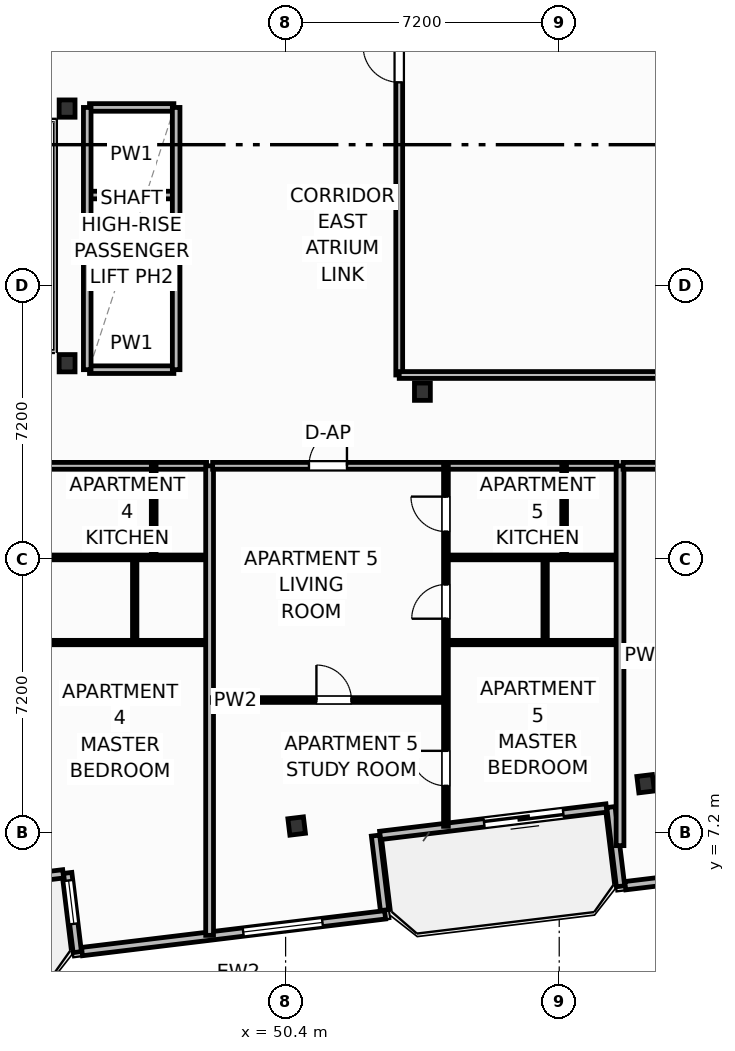
"""IFC4 building model, lengths in metres.
Left out: names, types, materials, properties, quantities, classifications, styles, units other than length and angle.
Written with IfcOpenShell. Run it as: python <this file> out.ifc"""

import sys

from ifc_helpers import new_model, si_unit, direction, frame, frame_2d, origin, origin_2d, place, context, subcontext, project, spatial, rectangle, i_section, extrude, element, fill, save


model = new_model("IFC4")
c1 = context("Model", 3, precision=1e-05, world=origin(), true_north=direction((0.0, 1.0)))
c2 = subcontext(c1, "Body", "Model", "MODEL_VIEW")
j1 = project(units=[si_unit("LENGTHUNIT", "METRE"), si_unit("PLANEANGLEUNIT", "RADIAN")], contexts=[c1])
p1 = place(None, origin())
s1 = spatial("IfcSite", under=j1, at=p1, CompositionType="ELEMENT")
p2 = place(p1, origin())
s2 = spatial("IfcBuilding", under=s1, at=p2, CompositionType="ELEMENT")
p3 = place(p2, frame((0.0, 0.0, 167.2)))
s3 = spatial("IfcBuildingStorey", under=s2, at=p3, CompositionType="ELEMENT", Elevation=167.2)
for number, where, z_axis, x_axis in (
    (1, (44.65, 19.55, 0.0), (0.0, 0.0, 1.0), (1.0, 0.0, 0.0)),
    (2, (44.65, 26.25, 0.0), (0.0, 0.0, 1.0), (1.0, 0.0, 0.0)),
    (3, (54.0, 18.8, 0.0), (0.0, 0.0, 1.0), (1.0, 0.0, 0.0)),
):
    element("IfcColumn", number, at=place(p3, frame(where, z_axis=z_axis, x_axis=x_axis)), inside=s3, PredefinedType="COLUMN", context=c2, shape_type="SweptSolid", body=[
        extrude(i_section(OverallWidth=0.418, OverallDepth=0.455, WebThickness=0.042, FlangeThickness=0.068, FilletRadius=0.025, at=origin_2d()), origin(), (0.0, 0.0, 1.0), 3.7),
    ])
for number, where, z_axis, x_axis in (
    (4, (50.691, 7.373, 0.0), (0.0, 0.0, 1.0), (0.993, 0.12, 0.0)),
    (5, (59.874, 8.486, 0.0), (0.0, 0.0, 1.0), (0.993, 0.12, 0.0)),
):
    element("IfcColumn", number, at=place(p3, frame(where, z_axis=z_axis, x_axis=x_axis)), inside=s3, PredefinedType="COLUMN", context=c2, shape_type="SweptSolid", body=[
        extrude(i_section(OverallWidth=0.412, OverallDepth=0.435, WebThickness=0.036, FlangeThickness=0.057, FilletRadius=0.025, at=origin_2d()), origin(), (0.0, 0.0, 1.0), 3.7),
    ])
p4 = place(p3, frame((44.548, 6.114, 0.0), z_axis=(0.0, 0.0, 1.0), x_axis=(-0.992735402148, -0.120318000826, 0.0)))
e6 = element("IfcWall", 6, at=p4, inside=s3, PredefinedType="SOLIDWALL", context=c2, shape_type="SweptSolid", body=[
    extrude(rectangle(XDim=6.0, YDim=0.22, at=frame_2d((3.0, 0.0))), origin(), (0.0, 0.0, 1.0), 2.73),
])
p5 = place(p4, frame((3.5, 0.0, 0.0)))
e7 = element("IfcOpeningElement", 7, at=p5, cuts=e6, PredefinedType="OPENING", context=c2, shape_type="SweptSolid", body=[
    extrude(rectangle(XDim=2.1, YDim=2.3, at=frame_2d((1.05, 1.15))), frame((0.0, 0.12, 0.0), z_axis=(0.0, -1.0, 0.0), x_axis=(1.0, 0.0, 0.0)), (0.0, 0.0, 1.0), 0.24),
])
p6 = place(p3, frame((58.843, 7.847, 0.0), z_axis=(0.0, 0.0, 1.0), x_axis=(-0.992729951822, -0.120362962556, 0.0)))
e8 = element("IfcWall", 8, at=p6, inside=s3, PredefinedType="SOLIDWALL", context=c2, shape_type="SweptSolid", body=[
    extrude(rectangle(XDim=6.0, YDim=0.22, at=frame_2d((3.0, 0.0))), origin(), (0.0, 0.0, 1.0), 2.73),
])
p7 = place(p6, frame((1.144, 0.0, 0.0)))
e9 = element("IfcOpeningElement", 9, at=p7, cuts=e8, PredefinedType="OPENING", context=c2, shape_type="SweptSolid", body=[
    extrude(rectangle(XDim=2.1, YDim=2.3, at=frame_2d((1.05, 1.15))), frame((0.0, 0.12, 0.0), z_axis=(0.0, -1.0, 0.0), x_axis=(1.0, 0.0, 0.0)), (0.0, 0.0, 1.0), 0.24),
])
p8 = place(p3, frame((44.666, 6.138, 0.0), z_axis=(0.0, 0.0, 1.0), x_axis=(0.120327895535, -0.992734202874, 0.0)))
e10 = element("IfcWall", 10, at=p8, inside=s3, PredefinedType="SOLIDWALL", context=c2, shape_type="SweptSolid", body=[
    extrude(rectangle(XDim=2.1, YDim=0.22, at=frame_2d((1.05, 0.0))), origin(), (0.0, 0.0, 1.0), 2.73),
])
p9 = place(p8, frame((0.2, 0.0, 0.8)))
e11 = element("IfcOpeningElement", 11, at=p9, cuts=e10, PredefinedType="OPENING", context=c2, shape_type="SweptSolid", body=[
    extrude(rectangle(XDim=1.15, YDim=1.4, at=frame_2d((0.575, 0.7))), frame((0.0, 0.12, 0.0), z_axis=(0.0, -1.0, 0.0), x_axis=(1.0, 0.0, 0.0)), (0.0, 0.0, 1.0), 0.24),
])
p10 = place(p3, frame((45.042, 4.069, 0.0), z_axis=(0.0, 0.0, 1.0), x_axis=(0.992731032022, 0.120354052946, 0.0)))
e12 = element("IfcWall", 12, at=p10, inside=s3, PredefinedType="SOLIDWALL", context=c2, shape_type="SweptSolid", body=[
    extrude(rectangle(XDim=8.035, YDim=0.22, at=frame_2d((4.018, 0.0))), origin(), (0.0, 0.0, 1.0), 2.73),
])
p11 = place(p10, frame((4.273, 0.0, 0.8)))
e13 = element("IfcOpeningElement", 13, at=p11, cuts=e12, PredefinedType="OPENING", context=c2, shape_type="SweptSolid", body=[
    extrude(rectangle(XDim=2.1, YDim=1.75, at=frame_2d((1.05, 0.875))), frame((0.0, 0.12, 0.0), z_axis=(0.0, -1.0, 0.0), x_axis=(1.0, 0.0, 0.0)), (0.0, 0.0, 1.0), 0.24),
])
p12 = place(p3, frame((53.004, 5.16, 0.0), z_axis=(0.0, 0.0, 1.0), x_axis=(-0.120397815541, 0.992725725472, 0.0)))
e14 = element("IfcWall", 14, at=p12, inside=s3, PredefinedType="SOLIDWALL", context=c2, shape_type="SweptSolid", body=[
    extrude(rectangle(XDim=1.975, YDim=0.22, at=frame_2d((0.988, 0.0))), origin(), (0.0, 0.0, 1.0), 2.73),
])
p13 = place(p3, frame((58.961, 7.872, 0.0), z_axis=(0.0, 0.0, 1.0), x_axis=(0.120327895535, -0.992734202874, 0.0)))
e15 = element("IfcWall", 15, at=p13, inside=s3, PredefinedType="SOLIDWALL", context=c2, shape_type="SweptSolid", body=[
    extrude(rectangle(XDim=2.1, YDim=0.22, at=frame_2d((1.05, 0.0))), origin(), (0.0, 0.0, 1.0), 2.73),
])
p14 = place(p3, frame((59.338, 5.802, 0.0), z_axis=(0.0, 0.0, 1.0), x_axis=(0.992731225757, 0.120352454927, 0.0)))
e16 = element("IfcWall", 16, at=p14, inside=s3, PredefinedType="SOLIDWALL", context=c2, shape_type="SweptSolid", body=[
    extrude(rectangle(XDim=12.447, YDim=0.22, at=frame_2d((6.224, 0.0))), origin(), (0.0, 0.0, 1.0), 2.73),
])
p15 = place(p14, frame((5.174, 0.0, 0.8)))
e17 = element("IfcOpeningElement", 17, at=p15, cuts=e16, PredefinedType="OPENING", context=c2, shape_type="SweptSolid", body=[
    extrude(rectangle(XDim=2.1, YDim=1.75, at=frame_2d((1.05, 0.875))), frame((0.0, 0.12, 0.0), z_axis=(0.0, -1.0, 0.0), x_axis=(1.0, 0.0, 0.0)), (0.0, 0.0, 1.0), 0.24),
])
p16 = place(p3, frame((37.68, 16.85, 0.0), z_axis=(0.0, 0.0, 1.0), x_axis=(1.0, 0.0, 0.0)))
e18 = element("IfcWall", 18, at=p16, inside=s3, PredefinedType="PARTITIONING", context=c2, shape_type="SweptSolid", body=[
    extrude(rectangle(XDim=10.64, YDim=0.18, at=frame_2d((5.32, 0.0))), origin(), (0.0, 0.0, 1.0), 3.45),
])
p17 = place(p16, frame((2.535, 0.0, 0.0)))
e19 = element("IfcOpeningElement", 19, at=p17, cuts=e18, PredefinedType="OPENING", context=c2, shape_type="SweptSolid", body=[
    extrude(rectangle(XDim=1.0, YDim=2.2, at=frame_2d((0.5, 1.1))), frame((0.0, 0.1, 0.0), z_axis=(0.0, -1.0, 0.0), x_axis=(1.0, 0.0, 0.0)), (0.0, 0.0, 1.0), 0.2),
])
p18 = place(p3, frame((43.889, 14.44, 0.0), z_axis=(0.0, 0.0, 1.0), x_axis=(1.0, 0.0, 0.0)))
e20 = element("IfcWall", 20, at=p18, inside=s3, PredefinedType="PARTITIONING", context=c2, shape_type="SweptSolid", body=[
    extrude(rectangle(XDim=4.431, YDim=0.125, at=frame_2d((2.215, 0.0))), origin(), (0.0, 0.0, 1.0), 3.45),
])
p19 = place(p3, frame((43.889, 12.2, 0.0), z_axis=(0.0, 0.0, 1.0), x_axis=(1.0, 0.0, 0.0)))
e21 = element("IfcWall", 21, at=p19, inside=s3, PredefinedType="PARTITIONING", context=c2, shape_type="SweptSolid", body=[
    extrude(rectangle(XDim=4.431, YDim=0.115, at=frame_2d((2.215, 0.0))), origin(), (0.0, 0.0, 1.0), 3.45),
])
p20 = place(p3, frame((46.929, 14.44, 0.0), z_axis=(0.0, 0.0, 1.0), x_axis=(0.0, 1.0, 0.0)))
e22 = element("IfcWall", 22, at=p20, inside=s3, PredefinedType="PARTITIONING", context=c2, shape_type="SweptSolid", body=[
    extrude(rectangle(XDim=2.41, YDim=0.125, at=frame_2d((1.205, 0.0))), origin(), (0.0, 0.0, 1.0), 3.45),
])
p21 = place(p3, frame((46.429, 12.2, 0.0), z_axis=(0.0, 0.0, 1.0), x_axis=(0.0, 1.0, 0.0)))
e23 = element("IfcWall", 23, at=p21, inside=s3, PredefinedType="PARTITIONING", context=c2, shape_type="SweptSolid", body=[
    extrude(rectangle(XDim=2.24, YDim=0.115, at=frame_2d((1.12, 0.0))), origin(), (0.0, 0.0, 1.0), 3.45),
])
p22 = place(p3, frame((48.4, 4.496, 0.0), z_axis=(0.0, 0.0, 1.0), x_axis=(0.0, 1.0, 0.0)))
e24 = element("IfcWall", 24, at=p22, inside=s3, PredefinedType="PARTITIONING", context=c2, shape_type="SweptSolid", body=[
    extrude(rectangle(XDim=12.354, YDim=0.205, at=frame_2d((6.177, 0.0))), origin(), (0.0, 0.0, 1.0), 3.45),
])
p23 = place(p3, frame((48.48, 10.688, 0.0), z_axis=(0.0, 0.0, 1.0), x_axis=(1.0, 0.0, 0.0)))
e25 = element("IfcWall", 25, at=p23, inside=s3, PredefinedType="PARTITIONING", context=c2, shape_type="SweptSolid", body=[
    extrude(rectangle(XDim=6.069, YDim=0.125, at=frame_2d((3.035, 0.0))), origin(), (0.0, 0.0, 1.0), 3.45),
])
p24 = place(p23, frame((2.731, 0.0, 0.0)))
e26 = element("IfcOpeningElement", 26, at=p24, cuts=e25, PredefinedType="OPENING", context=c2, shape_type="SweptSolid", body=[
    extrude(rectangle(XDim=0.92, YDim=2.05, at=frame_2d((0.46, 1.025))), frame((0.0, 0.073, 0.0), z_axis=(0.0, -1.0, 0.0), x_axis=(1.0, 0.0, 0.0)), (0.0, 0.0, 1.0), 0.145),
])
p25 = place(p3, frame((48.48, 16.85, 0.0), z_axis=(0.0, 0.0, 1.0), x_axis=(1.0, 0.0, 0.0)))
e27 = element("IfcWall", 27, at=p25, inside=s3, PredefinedType="PARTITIONING", context=c2, shape_type="SweptSolid", body=[
    extrude(rectangle(XDim=10.64, YDim=0.18, at=frame_2d((5.32, 0.0))), origin(), (0.0, 0.0, 1.0), 3.45),
])
p26 = place(p25, frame((2.535, 0.0, 0.0)))
e28 = element("IfcOpeningElement", 28, at=p26, cuts=e27, PredefinedType="OPENING", context=c2, shape_type="SweptSolid", body=[
    extrude(rectangle(XDim=1.0, YDim=2.2, at=frame_2d((0.5, 1.1))), frame((0.0, 0.1, 0.0), z_axis=(0.0, -1.0, 0.0), x_axis=(1.0, 0.0, 0.0)), (0.0, 0.0, 1.0), 0.2),
])
p27 = place(p3, frame((54.619, 7.365, 0.0), z_axis=(0.0, 0.0, 1.0), x_axis=(0.0, 1.0, 0.0)))
e29 = element("IfcWall", 29, at=p27, inside=s3, PredefinedType="PARTITIONING", context=c2, shape_type="SweptSolid", body=[
    extrude(rectangle(XDim=9.485, YDim=0.125, at=frame_2d((4.742, 0.0))), origin(), (0.0, 0.0, 1.0), 3.45),
])
p28 = place(p27, frame((1.065, 0.0, 0.0)))
e30 = element("IfcOpeningElement", 30, at=p28, cuts=e29, PredefinedType="OPENING", context=c2, shape_type="SweptSolid", body=[
    extrude(rectangle(XDim=0.92, YDim=2.05, at=frame_2d((0.46, 1.025))), frame((0.0, 0.073, 0.0), z_axis=(0.0, -1.0, 0.0), x_axis=(1.0, 0.0, 0.0)), (0.0, 0.0, 1.0), 0.145),
])
p29 = place(p27, frame((5.462, 0.0, 0.0)))
e31 = element("IfcOpeningElement", 31, at=p29, cuts=e29, PredefinedType="OPENING", context=c2, shape_type="SweptSolid", body=[
    extrude(rectangle(XDim=0.9, YDim=2.05, at=frame_2d((0.45, 1.025))), frame((0.0, 0.073, 0.0), z_axis=(0.0, -1.0, 0.0), x_axis=(1.0, 0.0, 0.0)), (0.0, 0.0, 1.0), 0.145),
])
p30 = place(p27, frame((7.755, 0.0, 0.0)))
e32 = element("IfcOpeningElement", 32, at=p30, cuts=e29, PredefinedType="OPENING", context=c2, shape_type="SweptSolid", body=[
    extrude(rectangle(XDim=0.92, YDim=2.05, at=frame_2d((0.46, 1.025))), frame((0.0, 0.073, 0.0), z_axis=(0.0, -1.0, 0.0), x_axis=(1.0, 0.0, 0.0)), (0.0, 0.0, 1.0), 0.145),
])
p31 = place(p3, frame((54.689, 14.44, 0.0), z_axis=(0.0, 0.0, 1.0), x_axis=(1.0, 0.0, 0.0)))
e33 = element("IfcWall", 33, at=p31, inside=s3, PredefinedType="PARTITIONING", context=c2, shape_type="SweptSolid", body=[
    extrude(rectangle(XDim=4.431, YDim=0.125, at=frame_2d((2.215, 0.0))), origin(), (0.0, 0.0, 1.0), 3.45),
])
p32 = place(p3, frame((54.689, 12.2, 0.0), z_axis=(0.0, 0.0, 1.0), x_axis=(1.0, 0.0, 0.0)))
e34 = element("IfcWall", 34, at=p32, inside=s3, PredefinedType="PARTITIONING", context=c2, shape_type="SweptSolid", body=[
    extrude(rectangle(XDim=4.431, YDim=0.115, at=frame_2d((2.215, 0.0))), origin(), (0.0, 0.0, 1.0), 3.45),
])
p33 = place(p3, frame((57.729, 14.44, 0.0), z_axis=(0.0, 0.0, 1.0), x_axis=(0.0, 1.0, 0.0)))
e35 = element("IfcWall", 35, at=p33, inside=s3, PredefinedType="PARTITIONING", context=c2, shape_type="SweptSolid", body=[
    extrude(rectangle(XDim=2.41, YDim=0.125, at=frame_2d((1.205, 0.0))), origin(), (0.0, 0.0, 1.0), 3.45),
])
p34 = place(p3, frame((57.229, 12.2, 0.0), z_axis=(0.0, 0.0, 1.0), x_axis=(0.0, 1.0, 0.0)))
e36 = element("IfcWall", 36, at=p34, inside=s3, PredefinedType="PARTITIONING", context=c2, shape_type="SweptSolid", body=[
    extrude(rectangle(XDim=2.24, YDim=0.115, at=frame_2d((1.12, 0.0))), origin(), (0.0, 0.0, 1.0), 3.45),
])
p35 = place(p3, frame((59.2, 6.856, 0.0), z_axis=(0.0, 0.0, 1.0), x_axis=(0.0, 1.0, 0.0)))
e37 = element("IfcWall", 37, at=p35, inside=s3, PredefinedType="PARTITIONING", context=c2, shape_type="SweptSolid", body=[
    extrude(rectangle(XDim=9.994, YDim=0.205, at=frame_2d((4.997, 0.0))), origin(), (0.0, 0.0, 1.0), 3.45),
])
p36 = place(p3, frame((59.28, 16.85, 0.0), z_axis=(0.0, 0.0, 1.0), x_axis=(1.0, 0.0, 0.0)))
e38 = element("IfcWall", 38, at=p36, inside=s3, PredefinedType="PARTITIONING", context=c2, shape_type="SweptSolid", body=[
    extrude(rectangle(XDim=16.322, YDim=0.18, at=frame_2d((8.161, 0.0))), origin(), (0.0, 0.0, 1.0), 3.45),
])
p37 = place(p36, frame((0.916, 0.0, 0.0)))
e39 = element("IfcOpeningElement", 39, at=p37, cuts=e38, PredefinedType="OPENING", context=c2, shape_type="SweptSolid", body=[
    extrude(rectangle(XDim=0.95, YDim=2.15, at=frame_2d((0.475, 1.075))), frame((0.0, 0.1, 0.0), z_axis=(0.0, -1.0, 0.0), x_axis=(1.0, 0.0, 0.0)), (0.0, 0.0, 1.0), 0.2),
])
p38 = place(p3, frame((53.39, 19.24, 0.0), z_axis=(0.0, 0.0, 1.0), x_axis=(0.0, 1.0, 0.0)))
e40 = element("IfcWall", 40, at=p38, inside=s3, PredefinedType="PARTITIONING", context=c2, shape_type="SweptSolid", body=[
    extrude(rectangle(XDim=20.06, YDim=0.18, at=frame_2d((10.03, 0.0))), origin(), (0.0, 0.0, 1.0), 3.45),
])
p39 = place(p38, frame((7.7, 0.0, 0.0)))
e41 = element("IfcOpeningElement", 41, at=p39, cuts=e40, PredefinedType="OPENING", context=c2, shape_type="SweptSolid", body=[
    extrude(rectangle(XDim=0.95, YDim=2.05, at=frame_2d((0.475, 1.025))), frame((0.0, 0.1, 0.0), z_axis=(0.0, -1.0, 0.0), x_axis=(1.0, 0.0, 0.0)), (0.0, 0.0, 1.0), 0.2),
])
p40 = place(p3, frame((53.39, 19.24, 0.0), z_axis=(0.0, 0.0, 1.0), x_axis=(1.0, 0.0, 0.0)))
e42 = element("IfcWall", 42, at=p40, inside=s3, PredefinedType="PARTITIONING", context=c2, shape_type="SweptSolid", body=[
    extrude(rectangle(XDim=21.922, YDim=0.18, at=frame_2d((10.961, 0.0))), origin(), (0.0, 0.0, 1.0), 2.662),
])
for number, where, z_axis, x_axis in (
    (43, (45.24, 21.675, 0.0), (0.0, 0.0, 1.0), (1.0, 0.0, 0.0)),
    (44, (45.24, 23.975, 0.0), (0.0, 0.0, 1.0), (1.0, 0.0, 0.0)),
):
    element("IfcWall", number, at=place(p3, frame(where, z_axis=z_axis, x_axis=x_axis)), inside=s3, PredefinedType="PARTITIONING", context=c2, shape_type="SweptSolid", body=[
        extrude(rectangle(XDim=2.22, YDim=0.2, at=frame_2d((1.11, 0.0))), origin(), (0.0, 0.0, 1.0), 3.45),
    ])
p41 = place(p3, frame((45.24, 19.38, 0.0), z_axis=(0.0, 0.0, 1.0), x_axis=(1.0, 0.0, 0.0)))
e45 = element("IfcWall", 45, at=p41, inside=s3, PredefinedType="PARTITIONING", context=c2, shape_type="SweptSolid", body=[
    extrude(rectangle(XDim=2.22, YDim=0.2, at=frame_2d((1.11, 0.0))), origin(), (0.0, 0.0, 1.0), 2.662),
])
p42 = place(p3, frame((45.24, 26.28, 0.0), z_axis=(0.0, 0.0, 1.0), x_axis=(1.0, 0.0, 0.0)))
e46 = element("IfcWall", 46, at=p42, inside=s3, PredefinedType="PARTITIONING", context=c2, shape_type="SweptSolid", body=[
    extrude(rectangle(XDim=2.22, YDim=0.2, at=frame_2d((1.11, 0.0))), origin(), (0.0, 0.0, 1.0), 3.45),
])
for number, where, z_axis, x_axis in (
    (47, (45.18, 19.38, 0.0), (0.0, 0.0, 1.0), (0.0, 1.0, 0.0)),
    (48, (47.52, 19.38, 0.0), (0.0, 0.0, 1.0), (0.0, 1.0, 0.0)),
):
    element("IfcWall", number, at=place(p3, frame(where, z_axis=z_axis, x_axis=x_axis)), inside=s3, PredefinedType="PARTITIONING", context=c2, shape_type="SweptSolid", body=[
        extrude(rectangle(XDim=6.9, YDim=0.2, at=frame_2d((3.45, 0.0))), origin(), (0.0, 0.0, 1.0), 3.45),
    ])
p43 = place(p7, origin())
e49 = element("IfcDoor", 49, at=p43, inside=s3, OperationType="SLIDING_TO_LEFT", PredefinedType="DOOR", context=c2, shape_type="SweptSolid", body=[
    extrude(rectangle(XDim=2.1, YDim=2.3, at=frame_2d((1.05, 1.15))), frame((0.0, 0.025, 0.0), z_axis=(0.0, -1.0, 0.0), x_axis=(1.0, 0.0, 0.0)), (0.0, 0.0, 1.0), 0.05),
])
fill(e9, e49)
p44 = place(p11, origin())
e50 = element("IfcWindow", 50, at=p44, inside=s3, PartitioningType="SINGLE_PANEL", PredefinedType="WINDOW", context=c2, shape_type="SweptSolid", body=[
    extrude(rectangle(XDim=2.1, YDim=1.75, at=frame_2d((1.05, 0.875))), frame((0.0, 0.03, 0.0), z_axis=(0.0, -1.0, 0.0), x_axis=(1.0, 0.0, 0.0)), (0.0, 0.0, 1.0), 0.06),
])
fill(e13, e50)
p45 = place(p24, origin())
e51 = element("IfcDoor", 51, at=p45, inside=s3, OperationType="SINGLE_SWING_LEFT", PredefinedType="DOOR", context=c2, shape_type="SweptSolid", body=[
    extrude(rectangle(XDim=0.92, YDim=2.05, at=frame_2d((0.46, 1.025))), frame((0.0, 0.025, 0.0), z_axis=(0.0, -1.0, 0.0), x_axis=(1.0, 0.0, 0.0)), (0.0, 0.0, 1.0), 0.05),
])
fill(e26, e51)
p46 = place(p26, origin())
e52 = element("IfcDoor", 52, at=p46, inside=s3, OperationType="SINGLE_SWING_RIGHT", PredefinedType="DOOR", context=c2, shape_type="SweptSolid", body=[
    extrude(rectangle(XDim=1.0, YDim=2.2, at=frame_2d((0.5, 1.1))), frame((0.0, 0.025, 0.0), z_axis=(0.0, -1.0, 0.0), x_axis=(1.0, 0.0, 0.0)), (0.0, 0.0, 1.0), 0.05),
])
fill(e28, e52)
p47 = place(p28, origin())
e53 = element("IfcDoor", 53, at=p47, inside=s3, OperationType="SINGLE_SWING_RIGHT", PredefinedType="DOOR", context=c2, shape_type="SweptSolid", body=[
    extrude(rectangle(XDim=0.92, YDim=2.05, at=frame_2d((0.46, 1.025))), frame((0.0, 0.025, 0.0), z_axis=(0.0, -1.0, 0.0), x_axis=(1.0, 0.0, 0.0)), (0.0, 0.0, 1.0), 0.05),
])
fill(e30, e53)
p48 = place(p29, origin())
e54 = element("IfcDoor", 54, at=p48, inside=s3, OperationType="SINGLE_SWING_LEFT", PredefinedType="DOOR", context=c2, shape_type="SweptSolid", body=[
    extrude(rectangle(XDim=0.9, YDim=2.05, at=frame_2d((0.45, 1.025))), frame((0.0, 0.025, 0.0), z_axis=(0.0, -1.0, 0.0), x_axis=(1.0, 0.0, 0.0)), (0.0, 0.0, 1.0), 0.05),
])
fill(e31, e54)
p49 = place(p30, origin())
e55 = element("IfcDoor", 55, at=p49, inside=s3, OperationType="SINGLE_SWING_RIGHT", PredefinedType="DOOR", context=c2, shape_type="SweptSolid", body=[
    extrude(rectangle(XDim=0.92, YDim=2.05, at=frame_2d((0.46, 1.025))), frame((0.0, 0.025, 0.0), z_axis=(0.0, -1.0, 0.0), x_axis=(1.0, 0.0, 0.0)), (0.0, 0.0, 1.0), 0.05),
])
fill(e32, e55)
p50 = place(p39, origin())
e56 = element("IfcDoor", 56, at=p50, inside=s3, OperationType="SINGLE_SWING_RIGHT", PredefinedType="DOOR", context=c2, shape_type="SweptSolid", body=[
    extrude(rectangle(XDim=0.95, YDim=2.05, at=frame_2d((0.475, 1.025))), frame((0.0, 0.025, 0.0), z_axis=(0.0, -1.0, 0.0), x_axis=(1.0, 0.0, 0.0)), (0.0, 0.0, 1.0), 0.05),
])
fill(e41, e56)
p51 = place(p9, origin())
e57 = element("IfcWindow", 57, at=p51, inside=s3, PartitioningType="SINGLE_PANEL", PredefinedType="WINDOW", context=c2, shape_type="SweptSolid", body=[
    extrude(rectangle(XDim=1.15, YDim=1.4, at=frame_2d((0.575, 0.7))), frame((0.0, 0.03, 0.0), z_axis=(0.0, -1.0, 0.0), x_axis=(1.0, 0.0, 0.0)), (0.0, 0.0, 1.0), 0.06),
])
fill(e11, e57)
save(model, sys.argv[1])
